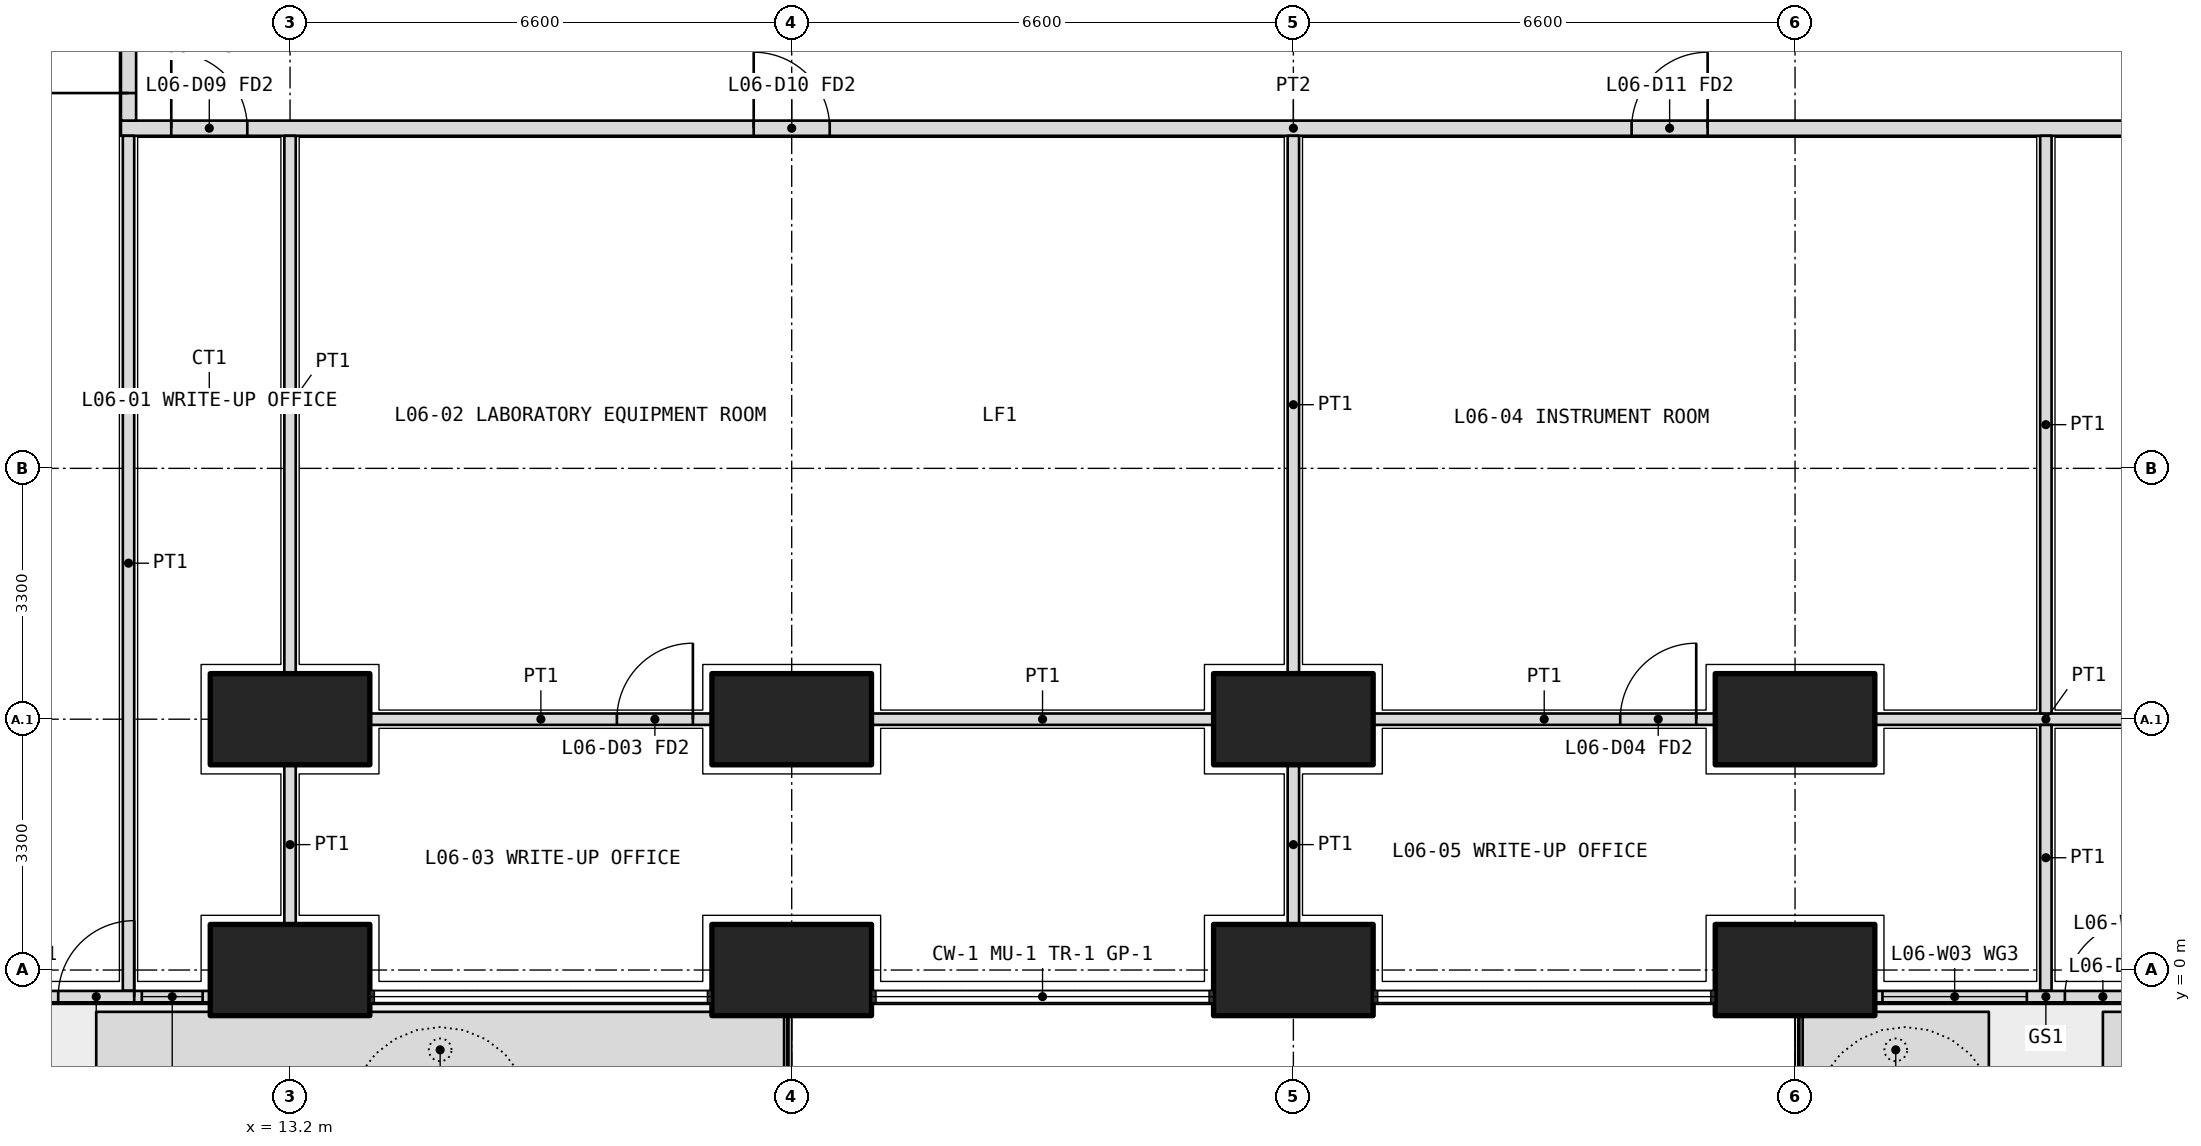
"""IFC4 building model, lengths in metres.
Left out: names, types, materials, properties, quantities, classifications, styles, units other than length and angle.
Written with IfcOpenShell. Run it as: python <this file> out.ifc"""

import sys

from ifc_helpers import new_model, si_unit, direction, frame, frame_2d, origin, origin_2d, place, context, subcontext, project, spatial, polyline, rectangle, outline, extrude, element, fill, save


model = new_model("IFC4")
c1 = context("Model", 3, precision=1e-05, world=origin(), true_north=direction((0.0, 1.0)))
c2 = subcontext(c1, "Body", "Model", "MODEL_VIEW")
j1 = project(units=[si_unit("LENGTHUNIT", "METRE"), si_unit("PLANEANGLEUNIT", "RADIAN")], contexts=[c1])
p1 = place(None, origin())
s1 = spatial("IfcSite", under=j1, at=p1, CompositionType="ELEMENT")
p2 = place(p1, origin())
s2 = spatial("IfcBuilding", under=s1, at=p2, CompositionType="ELEMENT")
p3 = place(p2, frame((0.0, 0.0, 29.7)))
s3 = spatial("IfcBuildingStorey", under=s2, at=p3, CompositionType="ELEMENT", Elevation=29.7)
for number, where, z_axis, x_axis in (
    (1, (13.2, 0.0, 0.0), (0.0, 0.0, 1.0), (1.0, 0.0, 0.0)),
    (2, (19.8, 0.0, 0.0), (0.0, 0.0, 1.0), (1.0, 0.0, 0.0)),
    (3, (26.4, 0.0, 0.0), (0.0, 0.0, 1.0), (1.0, 0.0, 0.0)),
    (4, (33.0, 0.0, 0.0), (0.0, 0.0, 1.0), (1.0, 0.0, 0.0)),
    (5, (13.2, 3.3, 0.0), (0.0, 0.0, 1.0), (1.0, 0.0, 0.0)),
    (6, (19.8, 3.3, 0.0), (0.0, 0.0, 1.0), (1.0, 0.0, 0.0)),
    (7, (26.4, 3.3, 0.0), (0.0, 0.0, 1.0), (1.0, 0.0, 0.0)),
    (8, (33.0, 3.3, 0.0), (0.0, 0.0, 1.0), (1.0, 0.0, 0.0)),
):
    element("IfcColumn", number, at=place(p3, frame(where, z_axis=z_axis, x_axis=x_axis)), inside=s3, PredefinedType="COLUMN", context=c2, shape_type="SweptSolid", body=[
        extrude(rectangle(XDim=2.1, YDim=1.2, at=origin_2d()), origin(), (0.0, 0.0, 1.0), 4.2),
    ])
p4 = place(p3, origin())
e9 = element("IfcWall", 9, at=p4, inside=s3, PredefinedType="USERDEFINED", context=c2, shape_type="SweptSolid", body=[
    extrude(outline(polyline([(10.65, -1.55), (19.7, -1.55), (19.7, -0.55), (10.65, -0.55), (10.65, -1.55)]), holes=[polyline([(10.8, -1.4), (19.55, -1.4), (19.55, -0.7), (10.8, -0.7), (10.8, -1.4)])]), origin(), (0.0, 0.0, 1.0), 1.05),
])
p5 = place(p3, origin())
e10 = element("IfcWall", 10, at=p5, inside=s3, PredefinedType="USERDEFINED", context=c2, shape_type="SweptSolid", body=[
    extrude(outline(polyline([(33.1, -1.55), (35.55, -1.55), (35.55, -0.55), (33.1, -0.55), (33.1, -1.55)]), holes=[polyline([(33.25, -1.4), (35.4, -1.4), (35.4, -0.7), (33.25, -0.7), (33.25, -1.4)])]), origin(), (0.0, 0.0, 1.0), 1.05),
])
p6 = place(p3, origin())
e11 = element("IfcWall", 11, at=p6, inside=s3, PredefinedType="USERDEFINED", context=c2, shape_type="SweptSolid", body=[
    extrude(outline(polyline([(37.05, -1.55), (46.1, -1.55), (46.1, -0.55), (37.05, -0.55), (37.05, -1.55)]), holes=[polyline([(37.2, -1.4), (45.95, -1.4), (45.95, -0.7), (37.2, -0.7), (37.2, -1.4)])]), origin(), (0.0, 0.0, 1.0), 1.05),
])
p7 = place(p3, frame((7.65, -0.35, 0.0), z_axis=(0.0, 0.0, 1.0), x_axis=(1.0, 0.0, 0.0)))
e12 = element("IfcWall", 12, at=p7, inside=s3, PredefinedType="SOLIDWALL", context=c2, shape_type="SweptSolid", body=[
    extrude(rectangle(XDim=4.5, YDim=0.15, at=frame_2d((2.25, 0.0))), origin(), (0.0, 0.0, 1.0), 2.7),
])
p8 = place(p7, frame((2.5, 0.0, 0.0)))
e13 = element("IfcOpeningElement", 13, at=p8, cuts=e12, PredefinedType="OPENING", context=c2, shape_type="SweptSolid", body=[
    extrude(rectangle(XDim=1.0, YDim=2.4, at=frame_2d((0.5, 1.2))), frame((0.0, 0.085, 0.0), z_axis=(0.0, -1.0, 0.0), x_axis=(1.0, 0.0, 0.0)), (0.0, 0.0, 1.0), 0.17),
])
p9 = place(p7, frame((0.1, 0.0, 0.1)))
e14 = element("IfcOpeningElement", 14, at=p9, cuts=e12, PredefinedType="OPENING", context=c2, shape_type="SweptSolid", body=[
    extrude(rectangle(XDim=1.9, YDim=2.3, at=frame_2d((0.95, 1.15))), frame((0.0, 0.085, 0.0), z_axis=(0.0, -1.0, 0.0), x_axis=(1.0, 0.0, 0.0)), (0.0, 0.0, 1.0), 0.17),
])
p10 = place(p7, frame((3.6, 0.0, 0.1)))
e15 = element("IfcOpeningElement", 15, at=p10, cuts=e12, PredefinedType="OPENING", context=c2, shape_type="SweptSolid", body=[
    extrude(rectangle(XDim=0.8, YDim=2.3, at=frame_2d((0.4, 1.15))), frame((0.0, 0.085, 0.0), z_axis=(0.0, -1.0, 0.0), x_axis=(1.0, 0.0, 0.0)), (0.0, 0.0, 1.0), 0.17),
])
p11 = place(p3, frame((34.05, -0.35, 0.0), z_axis=(0.0, 0.0, 1.0), x_axis=(1.0, 0.0, 0.0)))
e16 = element("IfcWall", 16, at=p11, inside=s3, PredefinedType="SOLIDWALL", context=c2, shape_type="SweptSolid", body=[
    extrude(rectangle(XDim=4.5, YDim=0.15, at=frame_2d((2.25, 0.0))), origin(), (0.0, 0.0, 1.0), 2.7),
])
p12 = place(p11, frame((2.5, 0.0, 0.0)))
e17 = element("IfcOpeningElement", 17, at=p12, cuts=e16, PredefinedType="OPENING", context=c2, shape_type="SweptSolid", body=[
    extrude(rectangle(XDim=1.0, YDim=2.4, at=frame_2d((0.5, 1.2))), frame((0.0, 0.085, 0.0), z_axis=(0.0, -1.0, 0.0), x_axis=(1.0, 0.0, 0.0)), (0.0, 0.0, 1.0), 0.17),
])
p13 = place(p11, frame((0.1, 0.0, 0.1)))
e18 = element("IfcOpeningElement", 18, at=p13, cuts=e16, PredefinedType="OPENING", context=c2, shape_type="SweptSolid", body=[
    extrude(rectangle(XDim=1.9, YDim=2.3, at=frame_2d((0.95, 1.15))), frame((0.0, 0.085, 0.0), z_axis=(0.0, -1.0, 0.0), x_axis=(1.0, 0.0, 0.0)), (0.0, 0.0, 1.0), 0.17),
])
p14 = place(p11, frame((3.6, 0.0, 0.1)))
e19 = element("IfcOpeningElement", 19, at=p14, cuts=e16, PredefinedType="OPENING", context=c2, shape_type="SweptSolid", body=[
    extrude(rectangle(XDim=0.8, YDim=2.3, at=frame_2d((0.4, 1.15))), frame((0.0, 0.085, 0.0), z_axis=(0.0, -1.0, 0.0), x_axis=(1.0, 0.0, 0.0)), (0.0, 0.0, 1.0), 0.17),
])
p15 = place(p3, frame((10.975, 11.075, 0.0), z_axis=(0.0, 0.0, 1.0), x_axis=(1.0, 0.0, 0.0)))
e20 = element("IfcWall", 20, at=p15, inside=s3, PredefinedType="PARTITIONING", context=c2, shape_type="SweptSolid", body=[
    extrude(rectangle(XDim=30.85, YDim=0.2, at=frame_2d((15.425, 0.0))), origin(), (0.0, 0.0, 1.0), 2.85),
])
p16 = place(p15, frame((0.663, 0.0, 0.0)))
e21 = element("IfcOpeningElement", 21, at=p16, cuts=e20, PredefinedType="OPENING", context=c2, shape_type="SweptSolid", body=[
    extrude(rectangle(XDim=1.0, YDim=2.1, at=frame_2d((0.5, 1.05))), frame((0.0, 0.11, 0.0), z_axis=(0.0, -1.0, 0.0), x_axis=(1.0, 0.0, 0.0)), (0.0, 0.0, 1.0), 0.22),
])
p17 = place(p15, frame((8.325, 0.0, 0.0)))
e22 = element("IfcOpeningElement", 22, at=p17, cuts=e20, PredefinedType="OPENING", context=c2, shape_type="SweptSolid", body=[
    extrude(rectangle(XDim=1.0, YDim=2.1, at=frame_2d((0.5, 1.05))), frame((0.0, 0.11, 0.0), z_axis=(0.0, -1.0, 0.0), x_axis=(1.0, 0.0, 0.0)), (0.0, 0.0, 1.0), 0.22),
])
p18 = place(p15, frame((19.875, 0.0, 0.0)))
e23 = element("IfcOpeningElement", 23, at=p18, cuts=e20, PredefinedType="OPENING", context=c2, shape_type="SweptSolid", body=[
    extrude(rectangle(XDim=1.0, YDim=2.1, at=frame_2d((0.5, 1.05))), frame((0.0, 0.11, 0.0), z_axis=(0.0, -1.0, 0.0), x_axis=(1.0, 0.0, 0.0)), (0.0, 0.0, 1.0), 0.22),
])
p19 = place(p15, frame((27.538, 0.0, 0.0)))
e24 = element("IfcOpeningElement", 24, at=p19, cuts=e20, PredefinedType="OPENING", context=c2, shape_type="SweptSolid", body=[
    extrude(rectangle(XDim=1.0, YDim=2.1, at=frame_2d((0.5, 1.05))), frame((0.0, 0.11, 0.0), z_axis=(0.0, -1.0, 0.0), x_axis=(1.0, 0.0, 0.0)), (0.0, 0.0, 1.0), 0.22),
])
p20 = place(p3, frame((11.075, 11.175, 0.0), z_axis=(0.0, 0.0, 1.0), x_axis=(0.0, 1.0, 0.0)))
e25 = element("IfcWall", 25, at=p20, inside=s3, PredefinedType="PARTITIONING", context=c2, shape_type="SweptSolid", body=[
    extrude(rectangle(XDim=23.85, YDim=0.2, at=frame_2d((11.925, 0.0))), origin(), (0.0, 0.0, 1.0), 2.85),
])
p21 = place(p20, frame((0.363, 0.0, 0.0)))
e26 = element("IfcOpeningElement", 26, at=p21, cuts=e25, PredefinedType="OPENING", context=c2, shape_type="SweptSolid", body=[
    extrude(rectangle(XDim=1.2, YDim=2.1, at=frame_2d((0.6, 1.05))), frame((0.0, 0.11, 0.0), z_axis=(0.0, -1.0, 0.0), x_axis=(1.0, 0.0, 0.0)), (0.0, 0.0, 1.0), 0.22),
])
p22 = place(p20, frame((2.575, 0.0, 0.0)))
e27 = element("IfcOpeningElement", 27, at=p22, cuts=e25, PredefinedType="OPENING", context=c2, shape_type="SweptSolid", body=[
    extrude(rectangle(XDim=1.0, YDim=2.1, at=frame_2d((0.5, 1.05))), frame((0.0, 0.11, 0.0), z_axis=(0.0, -1.0, 0.0), x_axis=(1.0, 0.0, 0.0)), (0.0, 0.0, 1.0), 0.22),
])
p23 = place(p20, frame((5.625, 0.0, 0.0)))
e28 = element("IfcOpeningElement", 28, at=p23, cuts=e25, PredefinedType="OPENING", context=c2, shape_type="SweptSolid", body=[
    extrude(rectangle(XDim=0.9, YDim=2.1, at=frame_2d((0.45, 1.05))), frame((0.0, 0.11, 0.0), z_axis=(0.0, -1.0, 0.0), x_axis=(1.0, 0.0, 0.0)), (0.0, 0.0, 1.0), 0.22),
])
p24 = place(p20, frame((9.425, 0.0, 0.0)))
e29 = element("IfcOpeningElement", 29, at=p24, cuts=e25, PredefinedType="OPENING", context=c2, shape_type="SweptSolid", body=[
    extrude(rectangle(XDim=0.9, YDim=2.1, at=frame_2d((0.45, 1.05))), frame((0.0, 0.11, 0.0), z_axis=(0.0, -1.0, 0.0), x_axis=(1.0, 0.0, 0.0)), (0.0, 0.0, 1.0), 0.22),
])
p25 = place(p20, frame((12.975, 0.0, 0.0)))
e30 = element("IfcOpeningElement", 30, at=p25, cuts=e25, PredefinedType="OPENING", context=c2, shape_type="SweptSolid", body=[
    extrude(rectangle(XDim=1.0, YDim=2.1, at=frame_2d((0.5, 1.05))), frame((0.0, 0.11, 0.0), z_axis=(0.0, -1.0, 0.0), x_axis=(1.0, 0.0, 0.0)), (0.0, 0.0, 1.0), 0.22),
])
p26 = place(p20, frame((17.925, 0.0, 0.0)))
e31 = element("IfcOpeningElement", 31, at=p26, cuts=e25, PredefinedType="OPENING", context=c2, shape_type="SweptSolid", body=[
    extrude(rectangle(XDim=1.2, YDim=2.1, at=frame_2d((0.6, 1.05))), frame((0.0, 0.11, 0.0), z_axis=(0.0, -1.0, 0.0), x_axis=(1.0, 0.0, 0.0)), (0.0, 0.0, 1.0), 0.22),
])
p27 = place(p20, frame((22.387, 0.0, 0.0)))
e32 = element("IfcOpeningElement", 32, at=p27, cuts=e25, PredefinedType="OPENING", context=c2, shape_type="SweptSolid", body=[
    extrude(rectangle(XDim=1.0, YDim=2.1, at=frame_2d((0.5, 1.05))), frame((0.0, 0.11, 0.0), z_axis=(0.0, -1.0, 0.0), x_axis=(1.0, 0.0, 0.0)), (0.0, 0.0, 1.0), 0.22),
])
p28 = place(p3, frame((11.075, -0.27, 0.0), z_axis=(0.0, 0.0, 1.0), x_axis=(0.0, 1.0, 0.0)))
e33 = element("IfcWall", 33, at=p28, inside=s3, PredefinedType="PARTITIONING", context=c2, shape_type="SweptSolid", body=[
    extrude(rectangle(XDim=11.245, YDim=0.15, at=frame_2d((5.623, 0.0))), origin(), (0.0, 0.0, 1.0), 2.7),
])
p29 = place(p3, frame((14.25, 3.3, 0.0), z_axis=(0.0, 0.0, 1.0), x_axis=(1.0, 0.0, 0.0)))
e34 = element("IfcWall", 34, at=p29, inside=s3, PredefinedType="PARTITIONING", context=c2, shape_type="SweptSolid", body=[
    extrude(rectangle(XDim=4.5, YDim=0.15, at=frame_2d((2.25, 0.0))), origin(), (0.0, 0.0, 1.0), 3.9),
])
p30 = place(p29, frame((3.25, 0.0, 0.0)))
e35 = element("IfcOpeningElement", 35, at=p30, cuts=e34, PredefinedType="OPENING", context=c2, shape_type="SweptSolid", body=[
    extrude(rectangle(XDim=1.0, YDim=2.1, at=frame_2d((0.5, 1.05))), frame((0.0, 0.085, 0.0), z_axis=(0.0, -1.0, 0.0), x_axis=(1.0, 0.0, 0.0)), (0.0, 0.0, 1.0), 0.17),
])
p31 = place(p3, frame((20.85, 3.3, 0.0), z_axis=(0.0, 0.0, 1.0), x_axis=(1.0, 0.0, 0.0)))
e36 = element("IfcWall", 36, at=p31, inside=s3, PredefinedType="PARTITIONING", context=c2, shape_type="SweptSolid", body=[
    extrude(rectangle(XDim=4.5, YDim=0.15, at=frame_2d((2.25, 0.0))), origin(), (0.0, 0.0, 1.0), 3.9),
])
p32 = place(p3, frame((27.45, 3.3, 0.0), z_axis=(0.0, 0.0, 1.0), x_axis=(1.0, 0.0, 0.0)))
e37 = element("IfcWall", 37, at=p32, inside=s3, PredefinedType="PARTITIONING", context=c2, shape_type="SweptSolid", body=[
    extrude(rectangle(XDim=4.5, YDim=0.15, at=frame_2d((2.25, 0.0))), origin(), (0.0, 0.0, 1.0), 3.9),
])
p33 = place(p32, frame((3.25, 0.0, 0.0)))
e38 = element("IfcOpeningElement", 38, at=p33, cuts=e37, PredefinedType="OPENING", context=c2, shape_type="SweptSolid", body=[
    extrude(rectangle(XDim=1.0, YDim=2.1, at=frame_2d((0.5, 1.05))), frame((0.0, 0.085, 0.0), z_axis=(0.0, -1.0, 0.0), x_axis=(1.0, 0.0, 0.0)), (0.0, 0.0, 1.0), 0.17),
])
p34 = place(p3, frame((34.05, 3.3, 0.0), z_axis=(0.0, 0.0, 1.0), x_axis=(1.0, 0.0, 0.0)))
e39 = element("IfcWall", 39, at=p34, inside=s3, PredefinedType="PARTITIONING", context=c2, shape_type="SweptSolid", body=[
    extrude(rectangle(XDim=4.5, YDim=0.15, at=frame_2d((2.25, 0.0))), origin(), (0.0, 0.0, 1.0), 3.9),
])
p35 = place(p3, frame((13.2, 0.6, 0.0), z_axis=(0.0, 0.0, 1.0), x_axis=(0.0, 1.0, 0.0)))
e40 = element("IfcWall", 40, at=p35, inside=s3, PredefinedType="PARTITIONING", context=c2, shape_type="SweptSolid", body=[
    extrude(rectangle(XDim=2.1, YDim=0.15, at=frame_2d((1.05, 0.0))), origin(), (0.0, 0.0, 1.0), 2.85),
])
p36 = place(p3, frame((13.2, 3.9, 0.0), z_axis=(0.0, 0.0, 1.0), x_axis=(0.0, 1.0, 0.0)))
e41 = element("IfcWall", 41, at=p36, inside=s3, PredefinedType="PARTITIONING", context=c2, shape_type="SweptSolid", body=[
    extrude(rectangle(XDim=7.075, YDim=0.15, at=frame_2d((3.538, 0.0))), origin(), (0.0, 0.0, 1.0), 2.85),
])
p37 = place(p3, frame((26.4, 0.6, 0.0), z_axis=(0.0, 0.0, 1.0), x_axis=(0.0, 1.0, 0.0)))
e42 = element("IfcWall", 42, at=p37, inside=s3, PredefinedType="PARTITIONING", context=c2, shape_type="SweptSolid", body=[
    extrude(rectangle(XDim=2.1, YDim=0.15, at=frame_2d((1.05, 0.0))), origin(), (0.0, 0.0, 1.0), 2.85),
])
p38 = place(p3, frame((26.4, 3.9, 0.0), z_axis=(0.0, 0.0, 1.0), x_axis=(0.0, 1.0, 0.0)))
e43 = element("IfcWall", 43, at=p38, inside=s3, PredefinedType="PARTITIONING", context=c2, shape_type="SweptSolid", body=[
    extrude(rectangle(XDim=7.075, YDim=0.15, at=frame_2d((3.538, 0.0))), origin(), (0.0, 0.0, 1.0), 2.85),
])
p39 = place(p3, frame((36.3, -0.27, 0.0), z_axis=(0.0, 0.0, 1.0), x_axis=(0.0, 1.0, 0.0)))
e44 = element("IfcWall", 44, at=p39, inside=s3, PredefinedType="PARTITIONING", context=c2, shape_type="SweptSolid", body=[
    extrude(rectangle(XDim=3.495, YDim=0.15, at=frame_2d((1.748, 0.0))), origin(), (0.0, 0.0, 1.0), 2.7),
])
p40 = place(p3, frame((36.3, 3.375, 0.0), z_axis=(0.0, 0.0, 1.0), x_axis=(0.0, 1.0, 0.0)))
e45 = element("IfcWall", 45, at=p40, inside=s3, PredefinedType="PARTITIONING", context=c2, shape_type="SweptSolid", body=[
    extrude(rectangle(XDim=7.6, YDim=0.15, at=frame_2d((3.8, 0.0))), origin(), (0.0, 0.0, 1.0), 3.9),
])
p41 = place(p8, origin())
e46 = element("IfcDoor", 46, at=p41, inside=s3, OperationType="SINGLE_SWING_RIGHT", PredefinedType="DOOR", context=c2, shape_type="SweptSolid", body=[
    extrude(rectangle(XDim=1.0, YDim=2.4, at=frame_2d((0.5, 1.2))), frame((0.0, 0.025, 0.0), z_axis=(0.0, -1.0, 0.0), x_axis=(1.0, 0.0, 0.0)), (0.0, 0.0, 1.0), 0.05),
])
fill(e13, e46)
p42 = place(p10, origin())
e47 = element("IfcWindow", 47, at=p42, inside=s3, PartitioningType="SINGLE_PANEL", PredefinedType="WINDOW", context=c2, shape_type="SweptSolid", body=[
    extrude(rectangle(XDim=0.8, YDim=2.3, at=frame_2d((0.4, 1.15))), frame((0.0, 0.03, 0.0), z_axis=(0.0, -1.0, 0.0), x_axis=(1.0, 0.0, 0.0)), (0.0, 0.0, 1.0), 0.06),
])
fill(e15, e47)
p43 = place(p12, origin())
e48 = element("IfcDoor", 48, at=p43, inside=s3, OperationType="SINGLE_SWING_RIGHT", PredefinedType="DOOR", context=c2, shape_type="SweptSolid", body=[
    extrude(rectangle(XDim=1.0, YDim=2.4, at=frame_2d((0.5, 1.2))), frame((0.0, 0.025, 0.0), z_axis=(0.0, -1.0, 0.0), x_axis=(1.0, 0.0, 0.0)), (0.0, 0.0, 1.0), 0.05),
])
fill(e17, e48)
p44 = place(p13, origin())
e49 = element("IfcWindow", 49, at=p44, inside=s3, PartitioningType="SINGLE_PANEL", PredefinedType="WINDOW", context=c2, shape_type="SweptSolid", body=[
    extrude(rectangle(XDim=1.9, YDim=2.3, at=frame_2d((0.95, 1.15))), frame((0.0, 0.03, 0.0), z_axis=(0.0, -1.0, 0.0), x_axis=(1.0, 0.0, 0.0)), (0.0, 0.0, 1.0), 0.06),
])
fill(e18, e49)
p45 = place(p16, origin())
e50 = element("IfcDoor", 50, at=p45, inside=s3, OperationType="SINGLE_SWING_LEFT", PredefinedType="DOOR", context=c2, shape_type="SweptSolid", body=[
    extrude(rectangle(XDim=1.0, YDim=2.1, at=frame_2d((0.5, 1.05))), frame((0.0, 0.025, 0.0), z_axis=(0.0, -1.0, 0.0), x_axis=(1.0, 0.0, 0.0)), (0.0, 0.0, 1.0), 0.05),
])
fill(e21, e50)
p46 = place(p17, origin())
e51 = element("IfcDoor", 51, at=p46, inside=s3, OperationType="SINGLE_SWING_LEFT", PredefinedType="DOOR", context=c2, shape_type="SweptSolid", body=[
    extrude(rectangle(XDim=1.0, YDim=2.1, at=frame_2d((0.5, 1.05))), frame((0.0, 0.025, 0.0), z_axis=(0.0, -1.0, 0.0), x_axis=(1.0, 0.0, 0.0)), (0.0, 0.0, 1.0), 0.05),
])
fill(e22, e51)
p47 = place(p30, origin())
e52 = element("IfcDoor", 52, at=p47, inside=s3, OperationType="SINGLE_SWING_RIGHT", PredefinedType="DOOR", context=c2, shape_type="SweptSolid", body=[
    extrude(rectangle(XDim=1.0, YDim=2.1, at=frame_2d((0.5, 1.05))), frame((0.0, 0.025, 0.0), z_axis=(0.0, -1.0, 0.0), x_axis=(1.0, 0.0, 0.0)), (0.0, 0.0, 1.0), 0.05),
])
fill(e35, e52)
p48 = place(p18, origin())
e53 = element("IfcDoor", 53, at=p48, inside=s3, OperationType="SINGLE_SWING_RIGHT", PredefinedType="DOOR", context=c2, shape_type="SweptSolid", body=[
    extrude(rectangle(XDim=1.0, YDim=2.1, at=frame_2d((0.5, 1.05))), frame((0.0, 0.025, 0.0), z_axis=(0.0, -1.0, 0.0), x_axis=(1.0, 0.0, 0.0)), (0.0, 0.0, 1.0), 0.05),
])
fill(e23, e53)
p49 = place(p33, origin())
e54 = element("IfcDoor", 54, at=p49, inside=s3, OperationType="SINGLE_SWING_RIGHT", PredefinedType="DOOR", context=c2, shape_type="SweptSolid", body=[
    extrude(rectangle(XDim=1.0, YDim=2.1, at=frame_2d((0.5, 1.05))), frame((0.0, 0.025, 0.0), z_axis=(0.0, -1.0, 0.0), x_axis=(1.0, 0.0, 0.0)), (0.0, 0.0, 1.0), 0.05),
])
fill(e38, e54)
p50 = place(p21, origin())
e55 = element("IfcDoor", 55, at=p50, inside=s3, OperationType="DOUBLE_DOOR_SINGLE_SWING", PredefinedType="DOOR", context=c2, shape_type="SweptSolid", body=[
    extrude(rectangle(XDim=1.2, YDim=2.1, at=frame_2d((0.6, 1.05))), frame((0.0, 0.025, 0.0), z_axis=(0.0, -1.0, 0.0), x_axis=(1.0, 0.0, 0.0)), (0.0, 0.0, 1.0), 0.05),
])
fill(e26, e55)
save(model, sys.argv[1])
